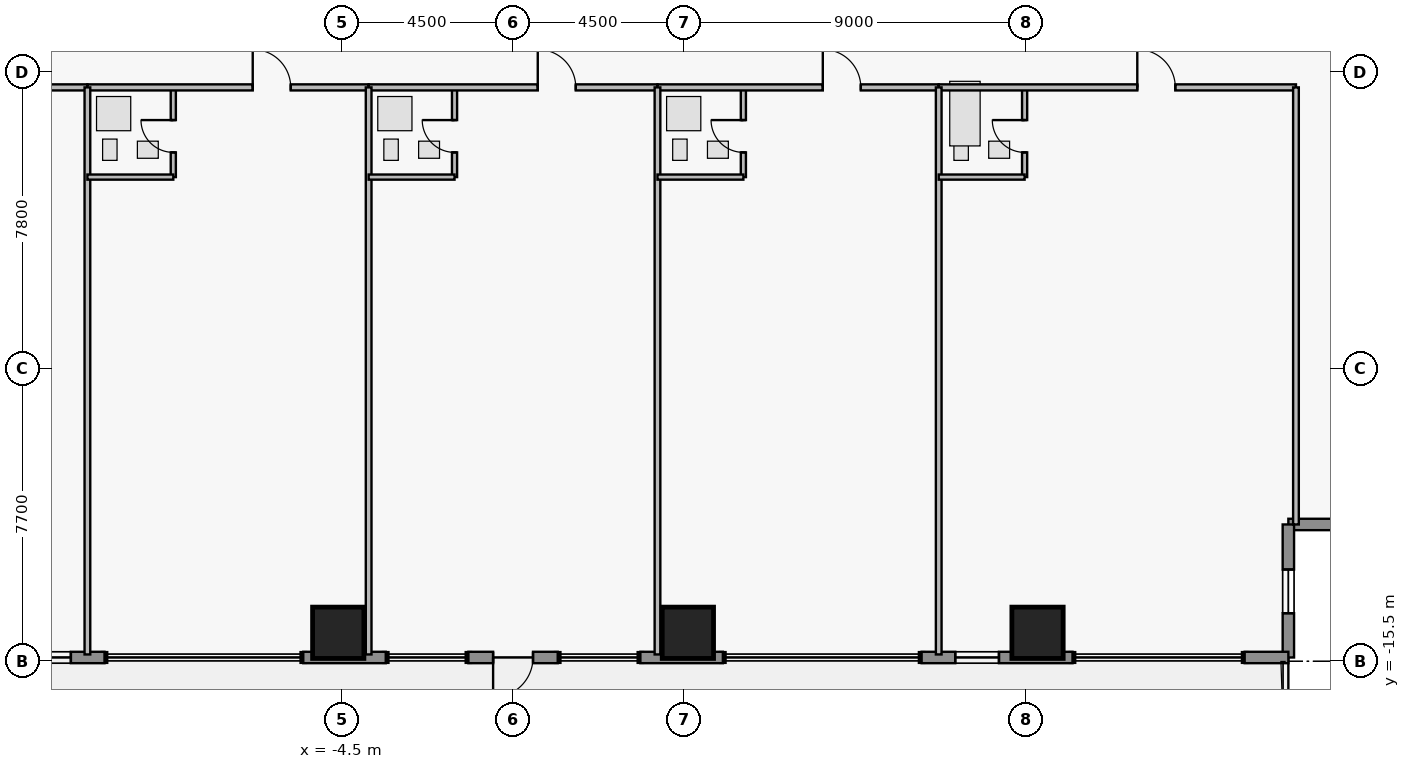
"""IFC4 building model, lengths in metres.
Left out: names, types, materials, properties, quantities, classifications, styles, units other than length and angle.
Written with IfcOpenShell. Run it as: python <this file> out.ifc"""

import sys

from ifc_helpers import new_model, si_unit, direction, frame, frame_2d, origin, origin_2d, place, context, subcontext, project, spatial, rectangle, extrude, element, fill, save


model = new_model("IFC4")
c1 = context("Model", 3, precision=1e-05, world=origin(), true_north=direction((0.0, 1.0)))
c2 = subcontext(c1, "Body", "Model", "MODEL_VIEW")
j1 = project(units=[si_unit("LENGTHUNIT", "METRE"), si_unit("PLANEANGLEUNIT", "RADIAN")], contexts=[c1])
p1 = place(None, origin())
s1 = spatial("IfcSite", under=j1, at=p1, CompositionType="ELEMENT")
p2 = place(p1, origin())
s2 = spatial("IfcBuilding", under=s1, at=p2, CompositionType="ELEMENT")
p3 = place(p2, frame((0.0, 0.0, 99.3)))
s3 = spatial("IfcBuildingStorey", under=s2, at=p3, CompositionType="ELEMENT", Elevation=99.3)
for number, where, z_axis, x_axis in (
    (1, (-4.6, -14.75, 0.0), (0.0, 0.0, 1.0), (1.0, 0.0, 0.0)),
    (2, (4.6, -14.75, 0.0), (0.0, 0.0, 1.0), (1.0, 0.0, 0.0)),
    (3, (13.8, -14.75, 0.0), (0.0, 0.0, 1.0), (1.0, 0.0, 0.0)),
):
    element("IfcColumn", number, at=place(p3, frame(where, z_axis=z_axis, x_axis=x_axis)), inside=s3, PredefinedType="COLUMN", context=c2, shape_type="SweptSolid", body=[
        extrude(rectangle(XDim=1.35, YDim=1.35, at=origin_2d()), origin(), (0.0, 0.0, 1.0), 3.65),
    ])
p4 = place(p3, frame((23.9, -11.9, 0.0), z_axis=(0.0, 0.0, 1.0), x_axis=(-1.0, 0.0, 0.0)))
e4 = element("IfcWall", 4, at=p4, inside=s3, PredefinedType="STANDARD", context=c2, shape_type="SweptSolid", body=[
    extrude(rectangle(XDim=3.5, YDim=0.3, at=frame_2d((1.75, 0.0))), origin(), (0.0, 0.0, 1.0), 3.43),
])
p5 = place(p4, frame((1.065, 0.0, 1.25)))
e5 = element("IfcOpeningElement", 5, at=p5, cuts=e4, PredefinedType="OPENING", context=c2, shape_type="SweptSolid", body=[
    extrude(rectangle(XDim=1.15, YDim=1.55, at=frame_2d((0.575, 0.775))), frame((0.0, 0.16, 0.0), z_axis=(0.0, -1.0, 0.0), x_axis=(1.0, 0.0, 0.0)), (0.0, 0.0, 1.0), 0.32),
])
p6 = place(p3, frame((20.4, -11.9, 0.0), z_axis=(0.0, 0.0, 1.0), x_axis=(0.0, -1.0, 0.0)))
e6 = element("IfcWall", 6, at=p6, inside=s3, PredefinedType="STANDARD", context=c2, shape_type="SweptSolid", body=[
    extrude(rectangle(XDim=3.5, YDim=0.3, at=frame_2d((1.75, 0.0))), origin(), (0.0, 0.0, 1.0), 3.43),
])
p7 = place(p6, frame((1.185, 0.0, 1.25)))
e7 = element("IfcOpeningElement", 7, at=p7, cuts=e6, PredefinedType="OPENING", context=c2, shape_type="SweptSolid", body=[
    extrude(rectangle(XDim=1.15, YDim=1.55, at=frame_2d((0.575, 0.775))), frame((0.0, 0.16, 0.0), z_axis=(0.0, -1.0, 0.0), x_axis=(1.0, 0.0, 0.0)), (0.0, 0.0, 1.0), 0.32),
])
p8 = place(p3, frame((20.4, -15.4, 0.0), z_axis=(0.0, 0.0, 1.0), x_axis=(-1.0, 0.0, 0.0)))
e8 = element("IfcWall", 8, at=p8, inside=s3, PredefinedType="STANDARD", context=c2, shape_type="SweptSolid", body=[
    extrude(rectangle(XDim=1.15, YDim=0.3, at=frame_2d((0.575, 0.0))), origin(), (0.0, 0.0, 1.0), 3.43),
])
p9 = place(p3, frame((14.72, -15.4, 0.0), z_axis=(0.0, 0.0, 1.0), x_axis=(-1.0, 0.0, 0.0)))
e9 = element("IfcWall", 9, at=p9, inside=s3, PredefinedType="STANDARD", context=c2, shape_type="SweptSolid", body=[
    extrude(rectangle(XDim=3.97, YDim=0.3, at=frame_2d((1.985, 0.0))), origin(), (0.0, 0.0, 1.0), 3.43),
])
p10 = place(p9, frame((1.935, 0.0, 0.95)))
e10 = element("IfcOpeningElement", 10, at=p10, cuts=e9, PredefinedType="OPENING", context=c2, shape_type="SweptSolid", body=[
    extrude(rectangle(XDim=1.15, YDim=1.55, at=frame_2d((0.575, 0.775))), frame((0.0, 0.16, 0.0), z_axis=(0.0, -1.0, 0.0), x_axis=(1.0, 0.0, 0.0)), (0.0, 0.0, 1.0), 0.32),
])
p11 = place(p3, frame((5.52, -15.4, 0.0), z_axis=(0.0, 0.0, 1.0), x_axis=(-1.0, 0.0, 0.0)))
e11 = element("IfcWall", 11, at=p11, inside=s3, PredefinedType="STANDARD", context=c2, shape_type="SweptSolid", body=[
    extrude(rectangle(XDim=2.17, YDim=0.3, at=frame_2d((1.085, 0.0))), origin(), (0.0, 0.0, 1.0), 3.43),
])
p12 = place(p3, frame((1.175, -15.4, 0.0), z_axis=(0.0, 0.0, 1.0), x_axis=(-1.0, 0.0, 0.0)))
e12 = element("IfcWall", 12, at=p12, inside=s3, PredefinedType="STANDARD", context=c2, shape_type="SweptSolid", body=[
    extrude(rectangle(XDim=2.35, YDim=0.3, at=frame_2d((1.175, 0.0))), origin(), (0.0, 0.0, 1.0), 3.43),
])
p13 = place(p12, frame((0.65, 0.0, 0.0)))
e13 = element("IfcOpeningElement", 13, at=p13, cuts=e12, PredefinedType="OPENING", context=c2, shape_type="SweptSolid", body=[
    extrude(rectangle(XDim=1.05, YDim=2.2, at=frame_2d((0.525, 1.1))), frame((0.0, 0.16, 0.0), z_axis=(0.0, -1.0, 0.0), x_axis=(1.0, 0.0, 0.0)), (0.0, 0.0, 1.0), 0.32),
])
p14 = place(p3, frame((-3.35, -15.4, 0.0), z_axis=(0.0, 0.0, 1.0), x_axis=(-1.0, 0.0, 0.0)))
e14 = element("IfcWall", 14, at=p14, inside=s3, PredefinedType="STANDARD", context=c2, shape_type="SweptSolid", body=[
    extrude(rectangle(XDim=2.17, YDim=0.3, at=frame_2d((1.085, 0.0))), origin(), (0.0, 0.0, 1.0), 3.43),
])
p15 = place(p3, frame((-10.75, -15.4, 0.0), z_axis=(0.0, 0.0, 1.0), x_axis=(-1.0, 0.0, 0.0)))
e15 = element("IfcWall", 15, at=p15, inside=s3, PredefinedType="STANDARD", context=c2, shape_type="SweptSolid", body=[
    extrude(rectangle(XDim=3.97, YDim=0.3, at=frame_2d((1.985, 0.0))), origin(), (0.0, 0.0, 1.0), 3.43),
])
p16 = place(p15, frame((0.885, 0.0, 0.95)))
e16 = element("IfcOpeningElement", 16, at=p16, cuts=e15, PredefinedType="OPENING", context=c2, shape_type="SweptSolid", body=[
    extrude(rectangle(XDim=1.15, YDim=1.55, at=frame_2d((0.575, 0.775))), frame((0.0, 0.16, 0.0), z_axis=(0.0, -1.0, 0.0), x_axis=(1.0, 0.0, 0.0)), (0.0, 0.0, 1.0), 0.32),
])
p17 = place(p3, frame((-20.6, -0.4, 0.0), z_axis=(0.0, 0.0, 1.0), x_axis=(1.0, 0.0, 0.0)))
e17 = element("IfcWall", 17, at=p17, inside=s3, PredefinedType="PARTITIONING", context=c2, shape_type="SweptSolid", body=[
    extrude(rectangle(XDim=9.4, YDim=0.16, at=frame_2d((4.7, 0.0))), origin(), (0.0, 0.0, 1.0), 3.43),
])
p18 = place(p17, frame((5.35, 0.0, 0.0)))
e18 = element("IfcOpeningElement", 18, at=p18, cuts=e17, PredefinedType="OPENING", context=c2, shape_type="SweptSolid", body=[
    extrude(rectangle(XDim=1.0, YDim=2.15, at=frame_2d((0.5, 1.075))), frame((0.0, 0.09, 0.0), z_axis=(0.0, -1.0, 0.0), x_axis=(1.0, 0.0, 0.0)), (0.0, 0.0, 1.0), 0.18),
])
p19 = place(p3, frame((-8.94, -2.76, 0.0), z_axis=(0.0, 0.0, 1.0), x_axis=(0.0, 1.0, 0.0)))
e19 = element("IfcWall", 19, at=p19, inside=s3, PredefinedType="PLUMBINGWALL", context=c2, shape_type="SweptSolid", body=[
    extrude(rectangle(XDim=2.36, YDim=0.135, at=frame_2d((1.18, 0.0))), origin(), (0.0, 0.0, 1.0), 3.43),
])
p20 = place(p19, frame((0.65, 0.0, 0.0)))
e20 = element("IfcOpeningElement", 20, at=p20, cuts=e19, PredefinedType="OPENING", context=c2, shape_type="SweptSolid", body=[
    extrude(rectangle(XDim=0.85, YDim=2.1, at=frame_2d((0.425, 1.05))), frame((0.0, 0.077, 0.0), z_axis=(0.0, -1.0, 0.0), x_axis=(1.0, 0.0, 0.0)), (0.0, 0.0, 1.0), 0.155),
])
p21 = place(p3, frame((-11.2, -0.4, 0.0), z_axis=(0.0, 0.0, 1.0), x_axis=(1.0, 0.0, 0.0)))
e21 = element("IfcWall", 21, at=p21, inside=s3, PredefinedType="PARTITIONING", context=c2, shape_type="SweptSolid", body=[
    extrude(rectangle(XDim=7.4, YDim=0.16, at=frame_2d((3.7, 0.0))), origin(), (0.0, 0.0, 1.0), 3.43),
])
p22 = place(p21, frame((4.35, 0.0, 0.0)))
e22 = element("IfcOpeningElement", 22, at=p22, cuts=e21, PredefinedType="OPENING", context=c2, shape_type="SweptSolid", body=[
    extrude(rectangle(XDim=1.0, YDim=2.15, at=frame_2d((0.5, 1.075))), frame((0.0, 0.09, 0.0), z_axis=(0.0, -1.0, 0.0), x_axis=(1.0, 0.0, 0.0)), (0.0, 0.0, 1.0), 0.18),
])
p23 = place(p3, frame((-1.54, -2.76, 0.0), z_axis=(0.0, 0.0, 1.0), x_axis=(0.0, 1.0, 0.0)))
e23 = element("IfcWall", 23, at=p23, inside=s3, PredefinedType="PLUMBINGWALL", context=c2, shape_type="SweptSolid", body=[
    extrude(rectangle(XDim=2.36, YDim=0.135, at=frame_2d((1.18, 0.0))), origin(), (0.0, 0.0, 1.0), 3.43),
])
p24 = place(p23, frame((0.65, 0.0, 0.0)))
e24 = element("IfcOpeningElement", 24, at=p24, cuts=e23, PredefinedType="OPENING", context=c2, shape_type="SweptSolid", body=[
    extrude(rectangle(XDim=0.85, YDim=2.1, at=frame_2d((0.425, 1.05))), frame((0.0, 0.077, 0.0), z_axis=(0.0, -1.0, 0.0), x_axis=(1.0, 0.0, 0.0)), (0.0, 0.0, 1.0), 0.155),
])
p25 = place(p3, frame((-3.8, -0.4, 0.0), z_axis=(0.0, 0.0, 1.0), x_axis=(1.0, 0.0, 0.0)))
e25 = element("IfcWall", 25, at=p25, inside=s3, PredefinedType="PARTITIONING", context=c2, shape_type="SweptSolid", body=[
    extrude(rectangle(XDim=7.6, YDim=0.16, at=frame_2d((3.8, 0.0))), origin(), (0.0, 0.0, 1.0), 3.43),
])
p26 = place(p25, frame((4.45, 0.0, 0.0)))
e26 = element("IfcOpeningElement", 26, at=p26, cuts=e25, PredefinedType="OPENING", context=c2, shape_type="SweptSolid", body=[
    extrude(rectangle(XDim=1.0, YDim=2.15, at=frame_2d((0.5, 1.075))), frame((0.0, 0.09, 0.0), z_axis=(0.0, -1.0, 0.0), x_axis=(1.0, 0.0, 0.0)), (0.0, 0.0, 1.0), 0.18),
])
p27 = place(p3, frame((6.06, -2.76, 0.0), z_axis=(0.0, 0.0, 1.0), x_axis=(0.0, 1.0, 0.0)))
e27 = element("IfcWall", 27, at=p27, inside=s3, PredefinedType="PLUMBINGWALL", context=c2, shape_type="SweptSolid", body=[
    extrude(rectangle(XDim=2.36, YDim=0.135, at=frame_2d((1.18, 0.0))), origin(), (0.0, 0.0, 1.0), 3.43),
])
p28 = place(p27, frame((0.65, 0.0, 0.0)))
e28 = element("IfcOpeningElement", 28, at=p28, cuts=e27, PredefinedType="OPENING", context=c2, shape_type="SweptSolid", body=[
    extrude(rectangle(XDim=0.85, YDim=2.1, at=frame_2d((0.425, 1.05))), frame((0.0, 0.077, 0.0), z_axis=(0.0, -1.0, 0.0), x_axis=(1.0, 0.0, 0.0)), (0.0, 0.0, 1.0), 0.155),
])
p29 = place(p3, frame((3.8, -0.4, 0.0), z_axis=(0.0, 0.0, 1.0), x_axis=(1.0, 0.0, 0.0)))
e29 = element("IfcWall", 29, at=p29, inside=s3, PredefinedType="PARTITIONING", context=c2, shape_type="SweptSolid", body=[
    extrude(rectangle(XDim=7.4, YDim=0.16, at=frame_2d((3.7, 0.0))), origin(), (0.0, 0.0, 1.0), 3.43),
])
p30 = place(p29, frame((4.35, 0.0, 0.0)))
e30 = element("IfcOpeningElement", 30, at=p30, cuts=e29, PredefinedType="OPENING", context=c2, shape_type="SweptSolid", body=[
    extrude(rectangle(XDim=1.0, YDim=2.15, at=frame_2d((0.5, 1.075))), frame((0.0, 0.09, 0.0), z_axis=(0.0, -1.0, 0.0), x_axis=(1.0, 0.0, 0.0)), (0.0, 0.0, 1.0), 0.18),
])
p31 = place(p3, frame((13.46, -2.76, 0.0), z_axis=(0.0, 0.0, 1.0), x_axis=(0.0, 1.0, 0.0)))
e31 = element("IfcWall", 31, at=p31, inside=s3, PredefinedType="PLUMBINGWALL", context=c2, shape_type="SweptSolid", body=[
    extrude(rectangle(XDim=2.36, YDim=0.135, at=frame_2d((1.18, 0.0))), origin(), (0.0, 0.0, 1.0), 2.747),
])
p32 = place(p31, frame((0.65, 0.0, 0.0)))
e32 = element("IfcOpeningElement", 32, at=p32, cuts=e31, PredefinedType="OPENING", context=c2, shape_type="SweptSolid", body=[
    extrude(rectangle(XDim=0.85, YDim=2.1, at=frame_2d((0.425, 1.05))), frame((0.0, 0.077, 0.0), z_axis=(0.0, -1.0, 0.0), x_axis=(1.0, 0.0, 0.0)), (0.0, 0.0, 1.0), 0.155),
])
p33 = place(p3, frame((11.2, -0.4, 0.0), z_axis=(0.0, 0.0, 1.0), x_axis=(1.0, 0.0, 0.0)))
e33 = element("IfcWall", 33, at=p33, inside=s3, PredefinedType="PARTITIONING", context=c2, shape_type="SweptSolid", body=[
    extrude(rectangle(XDim=9.4, YDim=0.16, at=frame_2d((4.7, 0.0))), origin(), (0.0, 0.0, 1.0), 3.43),
])
p34 = place(p33, frame((5.225, 0.0, 0.0)))
e34 = element("IfcOpeningElement", 34, at=p34, cuts=e33, PredefinedType="OPENING", context=c2, shape_type="SweptSolid", body=[
    extrude(rectangle(XDim=1.0, YDim=2.15, at=frame_2d((0.5, 1.075))), frame((0.0, 0.09, 0.0), z_axis=(0.0, -1.0, 0.0), x_axis=(1.0, 0.0, 0.0)), (0.0, 0.0, 1.0), 0.18),
])
p35 = place(p3, frame((-11.2, -15.32, 0.0), z_axis=(0.0, 0.0, 1.0), x_axis=(0.0, 1.0, 0.0)))
e35 = element("IfcWall", 35, at=p35, inside=s3, PredefinedType="PARTITIONING", context=c2, shape_type="SweptSolid", body=[
    extrude(rectangle(XDim=14.92, YDim=0.15, at=frame_2d((7.46, 0.0))), origin(), (0.0, 0.0, 1.0), 3.43),
])
p36 = place(p3, frame((-11.2, -2.76, 0.0), z_axis=(0.0, 0.0, 1.0), x_axis=(1.0, 0.0, 0.0)))
e36 = element("IfcWall", 36, at=p36, inside=s3, PredefinedType="PLUMBINGWALL", context=c2, shape_type="SweptSolid", body=[
    extrude(rectangle(XDim=2.26, YDim=0.135, at=frame_2d((1.13, 0.0))), origin(), (0.0, 0.0, 1.0), 3.43),
])
p37 = place(p3, frame((-3.8, -15.32, 0.0), z_axis=(0.0, 0.0, 1.0), x_axis=(0.0, 1.0, 0.0)))
e37 = element("IfcWall", 37, at=p37, inside=s3, PredefinedType="PARTITIONING", context=c2, shape_type="SweptSolid", body=[
    extrude(rectangle(XDim=14.92, YDim=0.15, at=frame_2d((7.46, 0.0))), origin(), (0.0, 0.0, 1.0), 3.43),
])
p38 = place(p3, frame((-3.8, -2.76, 0.0), z_axis=(0.0, 0.0, 1.0), x_axis=(1.0, 0.0, 0.0)))
e38 = element("IfcWall", 38, at=p38, inside=s3, PredefinedType="PLUMBINGWALL", context=c2, shape_type="SweptSolid", body=[
    extrude(rectangle(XDim=2.26, YDim=0.135, at=frame_2d((1.13, 0.0))), origin(), (0.0, 0.0, 1.0), 3.43),
])
p39 = place(p3, frame((3.8, -15.32, 0.0), z_axis=(0.0, 0.0, 1.0), x_axis=(0.0, 1.0, 0.0)))
e39 = element("IfcWall", 39, at=p39, inside=s3, PredefinedType="PARTITIONING", context=c2, shape_type="SweptSolid", body=[
    extrude(rectangle(XDim=14.92, YDim=0.15, at=frame_2d((7.46, 0.0))), origin(), (0.0, 0.0, 1.0), 3.43),
])
p40 = place(p3, frame((3.8, -2.76, 0.0), z_axis=(0.0, 0.0, 1.0), x_axis=(1.0, 0.0, 0.0)))
e40 = element("IfcWall", 40, at=p40, inside=s3, PredefinedType="PLUMBINGWALL", context=c2, shape_type="SweptSolid", body=[
    extrude(rectangle(XDim=2.26, YDim=0.135, at=frame_2d((1.13, 0.0))), origin(), (0.0, 0.0, 1.0), 3.43),
])
p41 = place(p3, frame((11.2, -15.32, 0.0), z_axis=(0.0, 0.0, 1.0), x_axis=(0.0, 1.0, 0.0)))
e41 = element("IfcWall", 41, at=p41, inside=s3, PredefinedType="PARTITIONING", context=c2, shape_type="SweptSolid", body=[
    extrude(rectangle(XDim=14.92, YDim=0.15, at=frame_2d((7.46, 0.0))), origin(), (0.0, 0.0, 1.0), 3.43),
])
p42 = place(p3, frame((11.2, -2.76, 0.0), z_axis=(0.0, 0.0, 1.0), x_axis=(1.0, 0.0, 0.0)))
e42 = element("IfcWall", 42, at=p42, inside=s3, PredefinedType="PLUMBINGWALL", context=c2, shape_type="SweptSolid", body=[
    extrude(rectangle(XDim=2.26, YDim=0.135, at=frame_2d((1.13, 0.0))), origin(), (0.0, 0.0, 1.0), 3.43),
])
p43 = place(p3, frame((20.6, -11.9, 0.0), z_axis=(0.0, 0.0, 1.0), x_axis=(0.0, 1.0, 0.0)))
e43 = element("IfcWall", 43, at=p43, inside=s3, PredefinedType="PARTITIONING", context=c2, shape_type="SweptSolid", body=[
    extrude(rectangle(XDim=11.5, YDim=0.15, at=frame_2d((5.75, 0.0))), origin(), (0.0, 0.0, 1.0), 3.43),
])
p44 = place(p7, origin())
e44 = element("IfcWindow", 44, at=p44, inside=s3, PartitioningType="SINGLE_PANEL", PredefinedType="WINDOW", context=c2, shape_type="SweptSolid", body=[
    extrude(rectangle(XDim=1.15, YDim=1.55, at=frame_2d((0.575, 0.775))), frame((0.0, 0.03, 0.0), z_axis=(0.0, -1.0, 0.0), x_axis=(1.0, 0.0, 0.0)), (0.0, 0.0, 1.0), 0.06),
])
fill(e7, e44)
p45 = place(p10, origin())
e45 = element("IfcWindow", 45, at=p45, inside=s3, PartitioningType="SINGLE_PANEL", PredefinedType="WINDOW", context=c2, shape_type="SweptSolid", body=[
    extrude(rectangle(XDim=1.15, YDim=1.55, at=frame_2d((0.575, 0.775))), frame((0.0, 0.03, 0.0), z_axis=(0.0, -1.0, 0.0), x_axis=(1.0, 0.0, 0.0)), (0.0, 0.0, 1.0), 0.06),
])
fill(e10, e45)
p46 = place(p13, origin())
e46 = element("IfcDoor", 46, at=p46, inside=s3, OperationType="SINGLE_SWING_RIGHT", PredefinedType="DOOR", context=c2, shape_type="SweptSolid", body=[
    extrude(rectangle(XDim=1.05, YDim=2.2, at=frame_2d((0.525, 1.1))), frame((0.0, 0.025, 0.0), z_axis=(0.0, -1.0, 0.0), x_axis=(1.0, 0.0, 0.0)), (0.0, 0.0, 1.0), 0.05),
])
fill(e13, e46)
p47 = place(p16, origin())
e47 = element("IfcWindow", 47, at=p47, inside=s3, PartitioningType="SINGLE_PANEL", PredefinedType="WINDOW", context=c2, shape_type="SweptSolid", body=[
    extrude(rectangle(XDim=1.15, YDim=1.55, at=frame_2d((0.575, 0.775))), frame((0.0, 0.03, 0.0), z_axis=(0.0, -1.0, 0.0), x_axis=(1.0, 0.0, 0.0)), (0.0, 0.0, 1.0), 0.06),
])
fill(e16, e47)
p48 = place(p20, origin())
e48 = element("IfcDoor", 48, at=p48, inside=s3, OperationType="SINGLE_SWING_RIGHT", PredefinedType="DOOR", context=c2, shape_type="SweptSolid", body=[
    extrude(rectangle(XDim=0.85, YDim=2.1, at=frame_2d((0.425, 1.05))), frame((0.0, 0.025, 0.0), z_axis=(0.0, -1.0, 0.0), x_axis=(1.0, 0.0, 0.0)), (0.0, 0.0, 1.0), 0.05),
])
fill(e20, e48)
p49 = place(p22, origin())
e49 = element("IfcDoor", 49, at=p49, inside=s3, OperationType="SINGLE_SWING_LEFT", PredefinedType="DOOR", context=c2, shape_type="SweptSolid", body=[
    extrude(rectangle(XDim=1.0, YDim=2.15, at=frame_2d((0.5, 1.075))), frame((0.0, 0.025, 0.0), z_axis=(0.0, -1.0, 0.0), x_axis=(1.0, 0.0, 0.0)), (0.0, 0.0, 1.0), 0.05),
])
fill(e22, e49)
p50 = place(p24, origin())
e50 = element("IfcDoor", 50, at=p50, inside=s3, OperationType="SINGLE_SWING_RIGHT", PredefinedType="DOOR", context=c2, shape_type="SweptSolid", body=[
    extrude(rectangle(XDim=0.85, YDim=2.1, at=frame_2d((0.425, 1.05))), frame((0.0, 0.025, 0.0), z_axis=(0.0, -1.0, 0.0), x_axis=(1.0, 0.0, 0.0)), (0.0, 0.0, 1.0), 0.05),
])
fill(e24, e50)
p51 = place(p26, origin())
e51 = element("IfcDoor", 51, at=p51, inside=s3, OperationType="SINGLE_SWING_LEFT", PredefinedType="DOOR", context=c2, shape_type="SweptSolid", body=[
    extrude(rectangle(XDim=1.0, YDim=2.15, at=frame_2d((0.5, 1.075))), frame((0.0, 0.025, 0.0), z_axis=(0.0, -1.0, 0.0), x_axis=(1.0, 0.0, 0.0)), (0.0, 0.0, 1.0), 0.05),
])
fill(e26, e51)
p52 = place(p28, origin())
e52 = element("IfcDoor", 52, at=p52, inside=s3, OperationType="SINGLE_SWING_RIGHT", PredefinedType="DOOR", context=c2, shape_type="SweptSolid", body=[
    extrude(rectangle(XDim=0.85, YDim=2.1, at=frame_2d((0.425, 1.05))), frame((0.0, 0.025, 0.0), z_axis=(0.0, -1.0, 0.0), x_axis=(1.0, 0.0, 0.0)), (0.0, 0.0, 1.0), 0.05),
])
fill(e28, e52)
p53 = place(p30, origin())
e53 = element("IfcDoor", 53, at=p53, inside=s3, OperationType="SINGLE_SWING_LEFT", PredefinedType="DOOR", context=c2, shape_type="SweptSolid", body=[
    extrude(rectangle(XDim=1.0, YDim=2.15, at=frame_2d((0.5, 1.075))), frame((0.0, 0.025, 0.0), z_axis=(0.0, -1.0, 0.0), x_axis=(1.0, 0.0, 0.0)), (0.0, 0.0, 1.0), 0.05),
])
fill(e30, e53)
p54 = place(p32, origin())
e54 = element("IfcDoor", 54, at=p54, inside=s3, OperationType="SINGLE_SWING_RIGHT", PredefinedType="DOOR", context=c2, shape_type="SweptSolid", body=[
    extrude(rectangle(XDim=0.85, YDim=2.1, at=frame_2d((0.425, 1.05))), frame((0.0, 0.025, 0.0), z_axis=(0.0, -1.0, 0.0), x_axis=(1.0, 0.0, 0.0)), (0.0, 0.0, 1.0), 0.05),
])
fill(e32, e54)
p55 = place(p34, origin())
e55 = element("IfcDoor", 55, at=p55, inside=s3, OperationType="SINGLE_SWING_LEFT", PredefinedType="DOOR", context=c2, shape_type="SweptSolid", body=[
    extrude(rectangle(XDim=1.0, YDim=2.15, at=frame_2d((0.5, 1.075))), frame((0.0, 0.025, 0.0), z_axis=(0.0, -1.0, 0.0), x_axis=(1.0, 0.0, 0.0)), (0.0, 0.0, 1.0), 0.05),
])
fill(e34, e55)
save(model, sys.argv[1])
